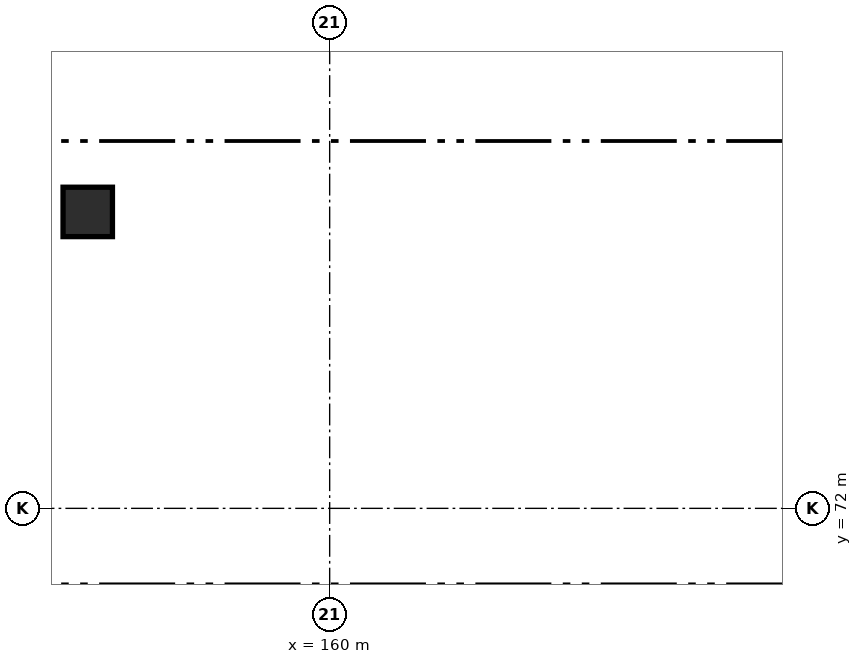
"""IFC4 building model, lengths in metres.
Left out: names, types, materials, properties, quantities, classifications, styles, units other than length and angle.
Written with IfcOpenShell. Run it as: python <this file> out.ifc"""

import sys

from ifc_helpers import new_model, si_unit, direction, frame, origin, origin_2d, place, context, subcontext, project, spatial, rectangle, extrude, element, save


model = new_model("IFC4")
c1 = context("Model", 3, precision=1e-05, world=origin(), true_north=direction((0.0, 1.0)))
c2 = subcontext(c1, "Body", "Model", "MODEL_VIEW")
j1 = project(units=[si_unit("LENGTHUNIT", "METRE"), si_unit("PLANEANGLEUNIT", "RADIAN")], contexts=[c1])
p1 = place(None, origin())
s1 = spatial("IfcSite", under=j1, at=p1, CompositionType="ELEMENT")
p2 = place(p1, origin())
s2 = spatial("IfcBuilding", under=s1, at=p2, CompositionType="ELEMENT")
p3 = place(p2, frame((0.0, 0.0, -3.84)))
s3 = spatial("IfcBuildingStorey", under=s2, at=p3, CompositionType="ELEMENT", Elevation=-3.84)
p4 = place(p3, frame((156.817, 75.9, 0.0), z_axis=(0.0, 0.0, 1.0), x_axis=(1.0, 0.0, 0.0)))
e1 = element("IfcColumn", 1, at=p4, inside=s3, PredefinedType="COLUMN", context=c2, shape_type="SweptSolid", body=[
    extrude(rectangle(XDim=0.65, YDim=0.65, at=origin_2d()), origin(), (0.0, 0.0, 1.0), 3.84),
])
save(model, sys.argv[1])
